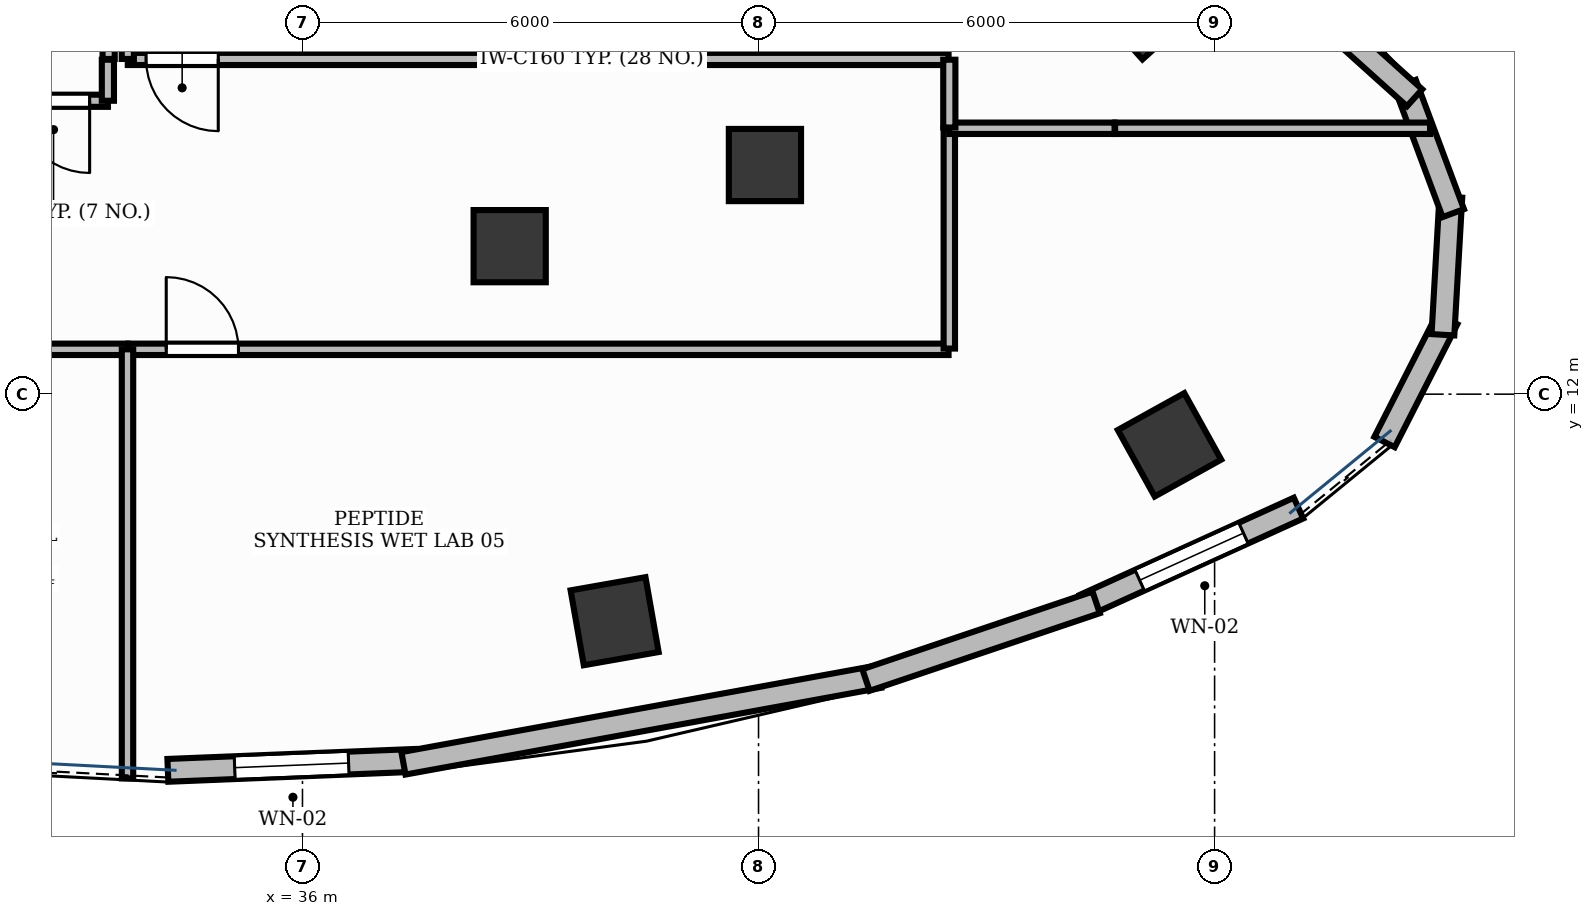
"""IFC4 building model, lengths in metres.
Left out: names, types, materials, properties, quantities, classifications, styles, units other than length and angle.
Written with IfcOpenShell. Run it as: python <this file> out.ifc"""

import sys

from ifc_helpers import new_model, si_unit, direction, frame, frame_2d, origin, origin_2d, place, context, subcontext, project, spatial, rectangle, extrude, element, fill, save


model = new_model("IFC4")
c1 = context("Model", 3, precision=1e-05, world=origin(), true_north=direction((0.0, 1.0)))
c2 = subcontext(c1, "Body", "Model", "MODEL_VIEW")
j1 = project(units=[si_unit("LENGTHUNIT", "METRE"), si_unit("PLANEANGLEUNIT", "RADIAN")], contexts=[c1])
p1 = place(None, origin())
s1 = spatial("IfcSite", under=j1, at=p1, CompositionType="ELEMENT")
p2 = place(p1, origin())
s2 = spatial("IfcBuilding", under=s1, at=p2, CompositionType="ELEMENT")
p3 = place(p2, frame((0.0, 0.0, 208.8)))
s3 = spatial("IfcBuildingStorey", under=s2, at=p3, CompositionType="ELEMENT", Elevation=208.8)
p4 = place(p3, frame((40.107, 9.013, -0.0), z_axis=(0.0, 0.0, 1.0), x_axis=(0.984868307662, 0.173304404339, 0.0)))
e1 = element("IfcColumn", 1, at=p4, inside=s3, PredefinedType="COLUMN", context=c2, shape_type="SweptSolid", body=[
    extrude(rectangle(XDim=1.0, YDim=1.0, at=origin_2d()), origin(), (0.0, 0.0, 1.0), 3.881),
])
p5 = place(p3, frame((38.726, 13.947, -0.0), z_axis=(0.0, 0.0, 1.0), x_axis=(1.0, 0.0, 0.0)))
e2 = element("IfcColumn", 2, at=p5, inside=s3, PredefinedType="COLUMN", context=c2, shape_type="SweptSolid", body=[
    extrude(rectangle(XDim=0.95, YDim=0.95, at=origin_2d()), origin(), (0.0, 0.0, 1.0), 3.881),
])
p6 = place(p3, frame((47.407, 11.334, -0.0), z_axis=(0.0, 0.0, 1.0), x_axis=(0.874535078577, 0.484962262797, 0.0)))
e3 = element("IfcColumn", 3, at=p6, inside=s3, PredefinedType="COLUMN", context=c2, shape_type="SweptSolid", body=[
    extrude(rectangle(XDim=1.0, YDim=1.0, at=origin_2d()), origin(), (0.0, 0.0, 1.0), 3.881),
])
p7 = place(p3, frame((42.084, 15.014, -0.0), z_axis=(0.0, 0.0, 1.0), x_axis=(1.0, 0.0, 0.0)))
e4 = element("IfcColumn", 4, at=p7, inside=s3, PredefinedType="COLUMN", context=c2, shape_type="SweptSolid", body=[
    extrude(rectangle(XDim=0.95, YDim=0.95, at=origin_2d()), origin(), (0.0, 0.0, 1.0), 3.881),
])
p8 = place(p3, frame((47.088, 17.111, -0.0), z_axis=(0.0, 0.0, 1.0), x_axis=(-0.669130606359, 0.743144825477, 0.0)))
e5 = element("IfcColumn", 5, at=p8, inside=s3, PredefinedType="COLUMN", context=c2, shape_type="SweptSolid", body=[
    extrude(rectangle(XDim=1.0, YDim=1.0, at=origin_2d()), origin(), (0.0, 0.0, 1.0), 3.881),
])
p9 = place(p3, frame((34.229, 7.051, 0.0), z_axis=(0.0, 0.0, 1.0), x_axis=(0.999187621273, 0.040300092979, 0.0)))
e6 = element("IfcWall", 6, at=p9, inside=s3, PredefinedType="STANDARD", context=c2, shape_type="SweptSolid", body=[
    extrude(rectangle(XDim=3.259, YDim=0.3, at=frame_2d((1.63, 0.0))), origin(), (0.0, 0.0, 1.0), 3.88),
])
p10 = place(p9, frame((0.88, 0.0, 0.95)))
e7 = element("IfcOpeningElement", 7, at=p10, cuts=e6, PredefinedType="OPENING", context=c2, shape_type="SweptSolid", body=[
    extrude(rectangle(XDim=1.5, YDim=1.8, at=frame_2d((0.75, 0.9))), frame((0.0, 0.165, 0.0), z_axis=(0.0, -1.0, 0.0), x_axis=(1.0, 0.0, 0.0)), (0.0, 0.0, 1.0), 0.33),
])
p11 = place(p3, frame((46.29, 9.223, 0.0), z_axis=(0.0, 0.0, 1.0), x_axis=(0.910501683298, 0.413505362372, 0.0)))
e8 = element("IfcWall", 8, at=p11, inside=s3, PredefinedType="STANDARD", context=c2, shape_type="SweptSolid", body=[
    extrude(rectangle(XDim=3.091, YDim=0.3, at=frame_2d((1.545, 0.0))), origin(), (0.0, 0.0, 1.0), 2.87),
])
p12 = place(p11, frame((0.795, 0.0, 0.95)))
e9 = element("IfcOpeningElement", 9, at=p12, cuts=e8, PredefinedType="OPENING", context=c2, shape_type="SweptSolid", body=[
    extrude(rectangle(XDim=1.5, YDim=1.8, at=frame_2d((0.75, 0.9))), frame((0.0, 0.165, 0.0), z_axis=(0.0, -1.0, 0.0), x_axis=(1.0, 0.0, 0.0)), (0.0, 0.0, 1.0), 0.33),
])
p13 = place(p3, frame((37.329, 7.143, 0.0), z_axis=(0.0, 0.0, 1.0), x_axis=(0.983789375997, 0.179327810658, 0.0)))
e10 = element("IfcWall", 10, at=p13, inside=s3, PredefinedType="STANDARD", context=c2, shape_type="SweptSolid", body=[
    extrude(rectangle(XDim=6.362, YDim=0.3, at=frame_2d((3.181, 0.0))), origin(), (0.0, 0.0, 1.0), 2.205),
])
p14 = place(p3, frame((43.413, 8.239, 0.0), z_axis=(0.0, 0.0, 1.0), x_axis=(0.947600715786, 0.319457169965, 0.0)))
e11 = element("IfcWall", 11, at=p14, inside=s3, PredefinedType="STANDARD", context=c2, shape_type="SweptSolid", body=[
    extrude(rectangle(XDim=3.196, YDim=0.3, at=frame_2d((1.598, 0.0))), origin(), (0.0, 0.0, 1.0), 3.88),
])
p15 = place(p3, frame((50.236, 11.371, 0.0), z_axis=(0.0, 0.0, 1.0), x_axis=(0.454139309712, 0.890930686066, 0.0)))
e12 = element("IfcWall", 12, at=p15, inside=s3, PredefinedType="STANDARD", context=c2, shape_type="SweptSolid", body=[
    extrude(rectangle(XDim=1.815, YDim=0.3, at=frame_2d((0.908, 0.0))), origin(), (0.0, 0.0, 1.0), 3.88),
])
p16 = place(p3, frame((51.004, 12.781, 0.0), z_axis=(0.0, 0.0, 1.0), x_axis=(0.057436686529, 0.998349150869, 0.0)))
e13 = element("IfcWall", 13, at=p16, inside=s3, PredefinedType="STANDARD", context=c2, shape_type="SweptSolid", body=[
    extrude(rectangle(XDim=1.815, YDim=0.3, at=frame_2d((0.907, 0.0))), origin(), (0.0, 0.0, 1.0), 3.88),
])
p17 = place(p3, frame((51.14, 14.382, 0.0), z_axis=(0.0, 0.0, 1.0), x_axis=(-0.348882068324, 0.937166635344, 0.0)))
e14 = element("IfcWall", 14, at=p17, inside=s3, PredefinedType="STANDARD", context=c2, shape_type="SweptSolid", body=[
    extrude(rectangle(XDim=1.815, YDim=0.3, at=frame_2d((0.908, 0.0))), origin(), (0.0, 0.0, 1.0), 3.88),
])
p18 = place(p3, frame((50.631, 15.899, 0.0), z_axis=(0.0, 0.0, 1.0), x_axis=(-0.743417638904, 0.668827492083, 0.0)))
e15 = element("IfcWall", 15, at=p18, inside=s3, PredefinedType="STANDARD", context=c2, shape_type="SweptSolid", body=[
    extrude(rectangle(XDim=3.244, YDim=0.3, at=frame_2d((1.622, 0.0))), origin(), (0.0, 0.0, 1.0), 3.88),
])
p19 = place(p3, frame((33.44, 15.86, 0.0), z_axis=(0.0, 0.0, 1.0), x_axis=(-1.0, 0.0, 0.0)))
e16 = element("IfcWall", 16, at=p19, inside=s3, PredefinedType="PARTITIONING", context=c2, shape_type="SweptSolid", body=[
    extrude(rectangle(XDim=3.28, YDim=0.16, at=frame_2d((1.64, 0.0))), origin(), (0.0, 0.0, 1.0), 2.22),
])
p20 = place(p19, frame((0.24, 0.0, 0.0)))
e17 = element("IfcOpeningElement", 17, at=p20, cuts=e16, PredefinedType="OPENING", context=c2, shape_type="SweptSolid", body=[
    extrude(rectangle(XDim=0.95, YDim=2.15, at=frame_2d((0.475, 1.075))), frame((0.0, 0.095, 0.0), z_axis=(0.0, -1.0, 0.0), x_axis=(1.0, 0.0, 0.0)), (0.0, 0.0, 1.0), 0.19),
])
p21 = place(p3, frame((21.679, 12.59, 0.0), z_axis=(0.0, 0.0, 1.0), x_axis=(1.0, 0.0, 0.0)))
e18 = element("IfcWall", 18, at=p21, inside=s3, PredefinedType="PARTITIONING", context=c2, shape_type="SweptSolid", body=[
    extrude(rectangle(XDim=12.019, YDim=0.15, at=frame_2d((6.01, 0.0))), origin(), (0.0, 0.0, 1.0), 2.22),
])
p22 = place(p21, frame((8.552, 0.0, 0.0)))
e19 = element("IfcOpeningElement", 19, at=p22, cuts=e18, PredefinedType="OPENING", context=c2, shape_type="SweptSolid", body=[
    extrude(rectangle(XDim=0.95, YDim=2.15, at=frame_2d((0.475, 1.075))), frame((0.0, 0.09, 0.0), z_axis=(0.0, -1.0, 0.0), x_axis=(1.0, 0.0, 0.0)), (0.0, 0.0, 1.0), 0.18),
])
p23 = place(p3, frame((33.708, 12.59, 0.0), z_axis=(0.0, 0.0, 1.0), x_axis=(1.0, 0.0, 0.0)))
e20 = element("IfcWall", 20, at=p23, inside=s3, PredefinedType="PARTITIONING", context=c2, shape_type="SweptSolid", body=[
    extrude(rectangle(XDim=10.792, YDim=0.15, at=frame_2d((5.396, 0.0))), origin(), (0.0, 0.0, 1.0), 2.22),
])
p24 = place(p23, frame((0.5, 0.0, 0.0)))
e21 = element("IfcOpeningElement", 21, at=p24, cuts=e20, PredefinedType="OPENING", context=c2, shape_type="SweptSolid", body=[
    extrude(rectangle(XDim=0.95, YDim=2.15, at=frame_2d((0.475, 1.075))), frame((0.0, 0.09, 0.0), z_axis=(0.0, -1.0, 0.0), x_axis=(1.0, 0.0, 0.0)), (0.0, 0.0, 1.0), 0.18),
])
p25 = place(p3, frame((44.5, 16.41, 0.0), z_axis=(0.0, 0.0, 1.0), x_axis=(-1.0, 0.0, 0.0)))
e22 = element("IfcWall", 22, at=p25, inside=s3, PredefinedType="PARTITIONING", context=c2, shape_type="SweptSolid", body=[
    extrude(rectangle(XDim=10.798, YDim=0.16, at=frame_2d((5.399, 0.0))), origin(), (0.0, 0.0, 1.0), 2.22),
])
p26 = place(p25, frame((9.608, 0.0, 0.0)))
e23 = element("IfcOpeningElement", 23, at=p26, cuts=e22, PredefinedType="OPENING", context=c2, shape_type="SweptSolid", body=[
    extrude(rectangle(XDim=0.95, YDim=2.15, at=frame_2d((0.475, 1.075))), frame((0.0, 0.095, 0.0), z_axis=(0.0, -1.0, 0.0), x_axis=(1.0, 0.0, 0.0)), (0.0, 0.0, 1.0), 0.19),
])
p27 = place(p3, frame((33.44, 16.4, 0.0), z_axis=(0.0, 0.0, 1.0), x_axis=(0.0, -1.0, 0.0)))
e24 = element("IfcWall", 24, at=p27, inside=s3, PredefinedType="PARTITIONING", context=c2, shape_type="SweptSolid", body=[
    extrude(rectangle(XDim=0.54, YDim=0.16, at=frame_2d((0.27, 0.0))), origin(), (0.0, 0.0, 1.0), 2.22),
])
p28 = place(p3, frame((33.45, 18.09, 0.0), z_axis=(0.0, 0.0, 1.0), x_axis=(0.0, -1.0, 0.0)))
e25 = element("IfcWall", 25, at=p28, inside=s3, PredefinedType="PARTITIONING", context=c2, shape_type="SweptSolid", body=[
    extrude(rectangle(XDim=1.68, YDim=0.16, at=frame_2d((0.84, 0.0))), origin(), (0.0, 0.0, 1.0), 2.22),
])
p29 = place(p3, frame((33.698, 12.59, 0.0), z_axis=(0.0, 0.0, 1.0), x_axis=(0.0, -1.0, 0.0)))
e26 = element("IfcWall", 26, at=p29, inside=s3, PredefinedType="PARTITIONING", context=c2, shape_type="SweptSolid", body=[
    extrude(rectangle(XDim=5.645, YDim=0.15, at=frame_2d((2.823, 0.0))), origin(), (0.0, 0.0, 1.0), 2.22),
])
p30 = place(p3, frame((46.691, 15.498, 0.0), z_axis=(0.0, 0.0, 1.0), x_axis=(1.0, 0.0, 0.0)))
e27 = element("IfcWall", 27, at=p30, inside=s3, PredefinedType="PARTITIONING", context=c2, shape_type="SweptSolid", body=[
    extrude(rectangle(XDim=4.143, YDim=0.15, at=frame_2d((2.071, 0.0))), origin(), (0.0, 0.0, 1.0), 2.22),
])
p31 = place(p3, frame((44.51, 12.6, 0.0), z_axis=(0.0, 0.0, 1.0), x_axis=(0.0, 1.0, 0.0)))
e28 = element("IfcWall", 28, at=p31, inside=s3, PredefinedType="PARTITIONING", context=c2, shape_type="SweptSolid", body=[
    extrude(rectangle(XDim=2.898, YDim=0.15, at=frame_2d((1.449, 0.0))), origin(), (0.0, 0.0, 1.0), 2.22),
])
p32 = place(p3, frame((44.51, 15.498, 0.0), z_axis=(0.0, 0.0, 1.0), x_axis=(1.0, 0.0, 0.0)))
e29 = element("IfcWall", 29, at=p32, inside=s3, PredefinedType="PARTITIONING", context=c2, shape_type="SweptSolid", body=[
    extrude(rectangle(XDim=2.174, YDim=0.15, at=frame_2d((1.087, 0.0))), origin(), (0.0, 0.0, 1.0), 2.22),
])
p33 = place(p3, frame((44.51, 15.508, 0.0), z_axis=(0.0, 0.0, 1.0), x_axis=(0.0, 1.0, 0.0)))
e30 = element("IfcWall", 30, at=p33, inside=s3, PredefinedType="PARTITIONING", context=c2, shape_type="SweptSolid", body=[
    extrude(rectangle(XDim=0.892, YDim=0.16, at=frame_2d((0.446, 0.0))), origin(), (0.0, 0.0, 1.0), 2.22),
])
p34 = place(p3, frame((33.702, 16.41, 0.0), z_axis=(0.0, 0.0, 1.0), x_axis=(0.0, 1.0, 0.0)))
e31 = element("IfcWall", 31, at=p34, inside=s3, PredefinedType="PARTITIONING", context=c2, shape_type="SweptSolid", body=[
    extrude(rectangle(XDim=1.68, YDim=0.16, at=frame_2d((0.84, 0.0))), origin(), (0.0, 0.0, 1.0), 2.22),
])
p35 = place(p10, origin())
e32 = element("IfcWindow", 32, at=p35, inside=s3, PartitioningType="DOUBLE_PANEL_VERTICAL", PredefinedType="WINDOW", context=c2, shape_type="SweptSolid", body=[
    extrude(rectangle(XDim=1.5, YDim=1.8, at=frame_2d((0.75, 0.9))), frame((0.0, 0.03, 0.0), z_axis=(0.0, -1.0, 0.0), x_axis=(1.0, 0.0, 0.0)), (0.0, 0.0, 1.0), 0.06),
])
fill(e7, e32)
p36 = place(p12, origin())
e33 = element("IfcWindow", 33, at=p36, inside=s3, PartitioningType="DOUBLE_PANEL_VERTICAL", PredefinedType="WINDOW", context=c2, shape_type="SweptSolid", body=[
    extrude(rectangle(XDim=1.5, YDim=1.8, at=frame_2d((0.75, 0.9))), frame((0.0, 0.03, 0.0), z_axis=(0.0, -1.0, 0.0), x_axis=(1.0, 0.0, 0.0)), (0.0, 0.0, 1.0), 0.06),
])
fill(e9, e33)
p37 = place(p20, origin())
e34 = element("IfcDoor", 34, at=p37, inside=s3, OperationType="SINGLE_SWING_LEFT", PredefinedType="DOOR", context=c2, shape_type="SweptSolid", body=[
    extrude(rectangle(XDim=0.95, YDim=2.15, at=frame_2d((0.475, 1.075))), frame((0.0, 0.025, 0.0), z_axis=(0.0, -1.0, 0.0), x_axis=(1.0, 0.0, 0.0)), (0.0, 0.0, 1.0), 0.05),
])
fill(e17, e34)
p38 = place(p24, origin())
e35 = element("IfcDoor", 35, at=p38, inside=s3, OperationType="SINGLE_SWING_LEFT", PredefinedType="DOOR", context=c2, shape_type="SweptSolid", body=[
    extrude(rectangle(XDim=0.95, YDim=2.15, at=frame_2d((0.475, 1.075))), frame((0.0, 0.025, 0.0), z_axis=(0.0, -1.0, 0.0), x_axis=(1.0, 0.0, 0.0)), (0.0, 0.0, 1.0), 0.05),
])
fill(e21, e35)
p39 = place(p26, origin())
e36 = element("IfcDoor", 36, at=p39, inside=s3, OperationType="SINGLE_SWING_LEFT", PredefinedType="DOOR", context=c2, shape_type="SweptSolid", body=[
    extrude(rectangle(XDim=0.95, YDim=2.15, at=frame_2d((0.475, 1.075))), frame((0.0, 0.025, 0.0), z_axis=(0.0, -1.0, 0.0), x_axis=(1.0, 0.0, 0.0)), (0.0, 0.0, 1.0), 0.05),
])
fill(e23, e36)
save(model, sys.argv[1])
